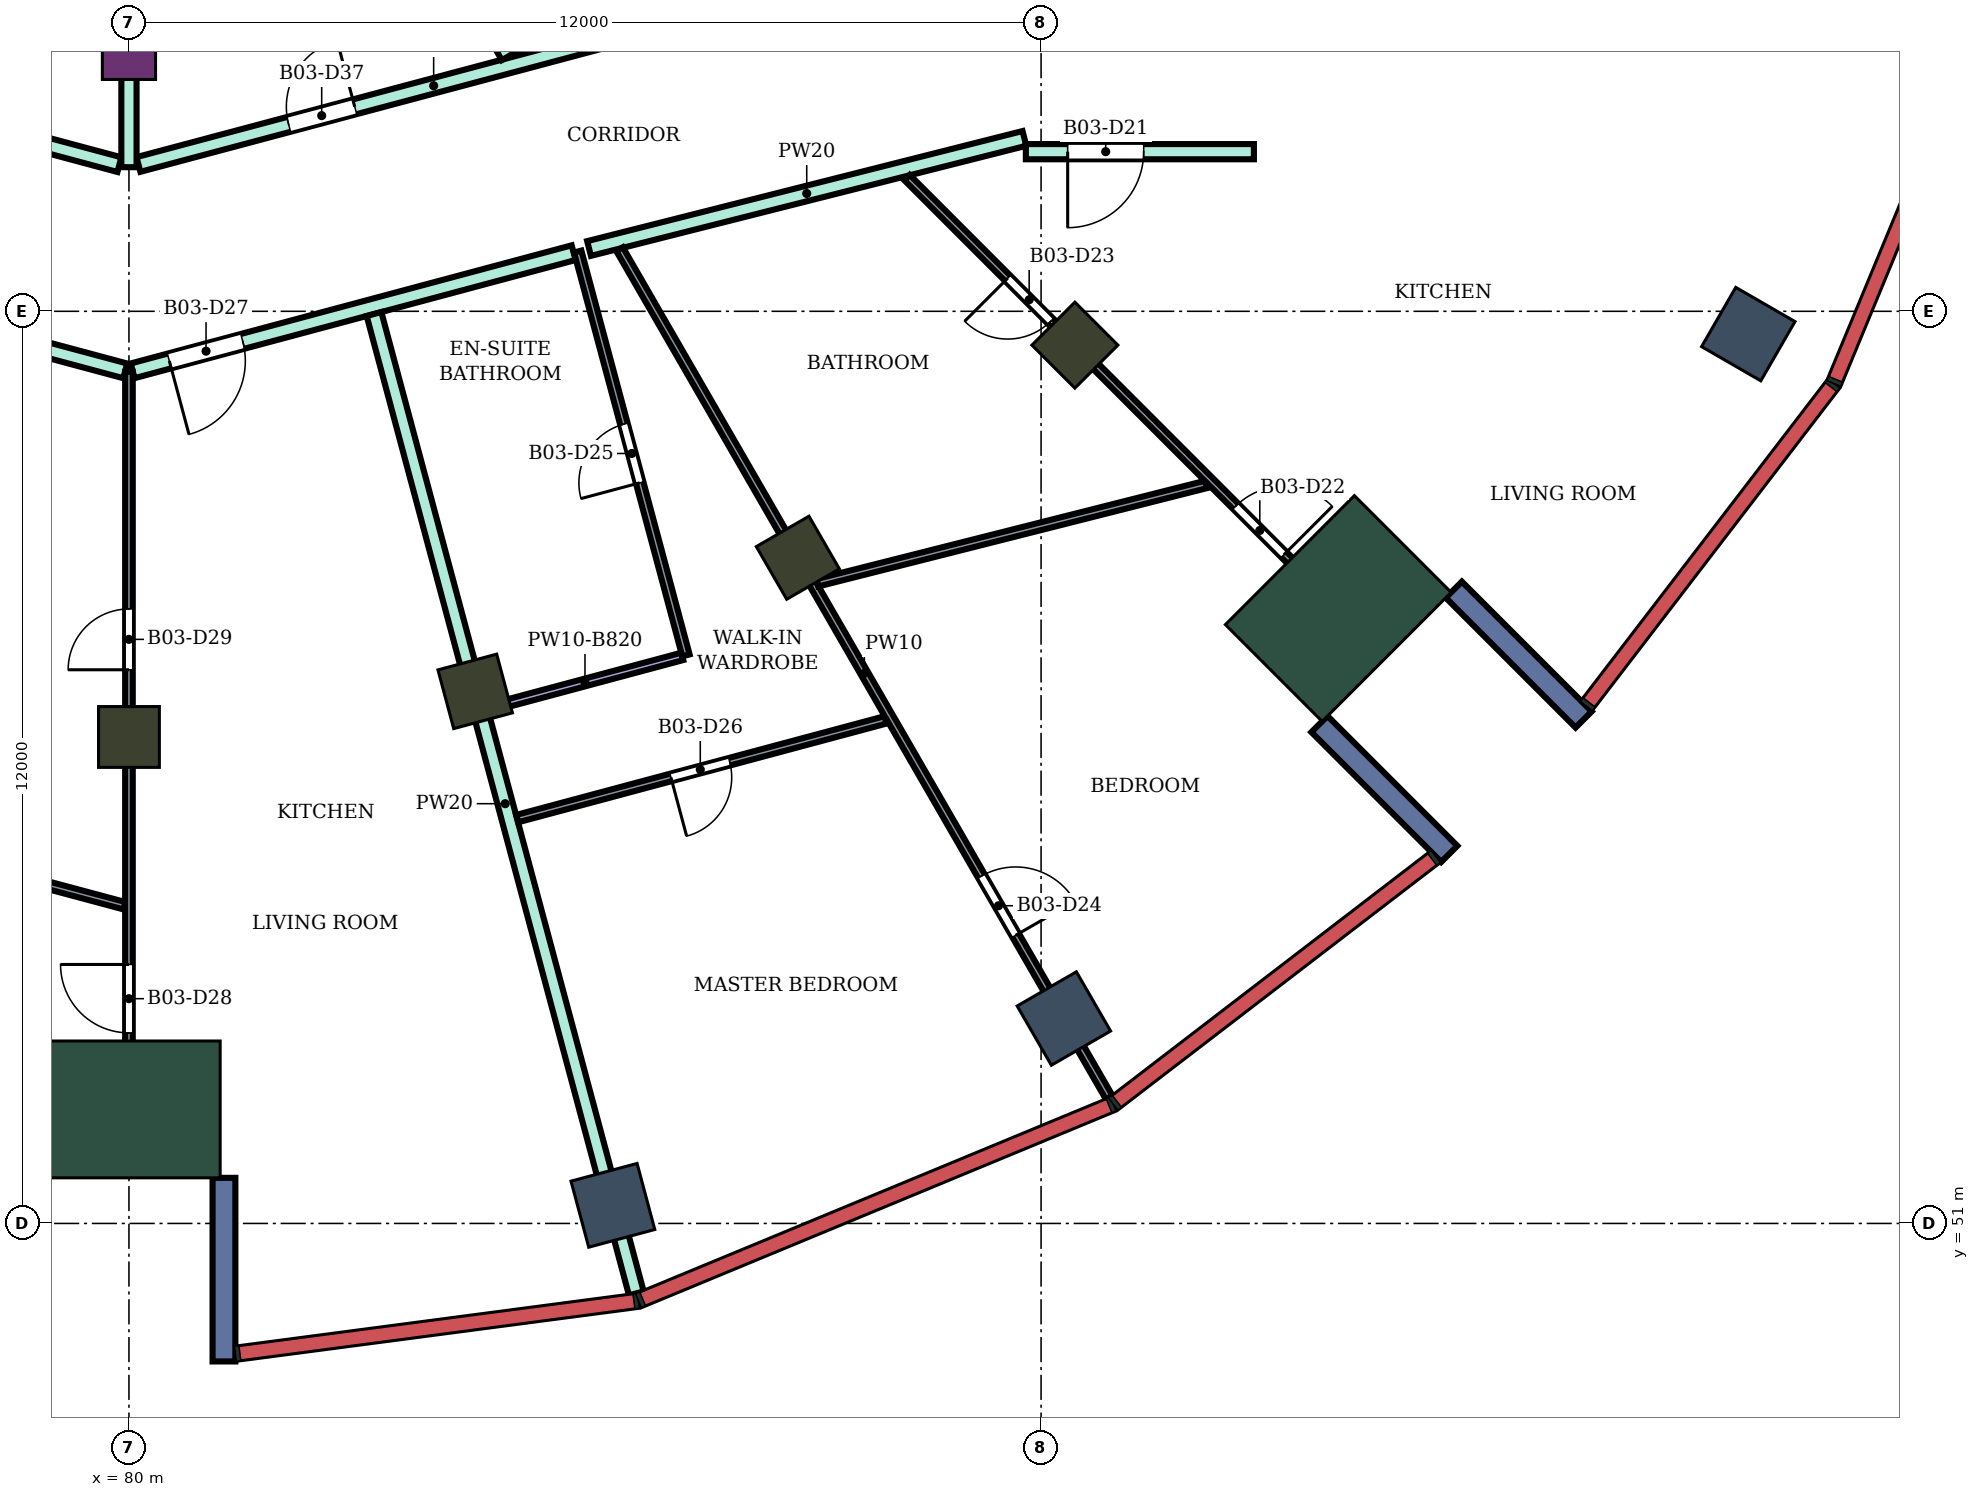
"""IFC4 building model, lengths in metres.
Left out: names, types, materials, properties, quantities, classifications, styles, units other than length and angle.
Written with IfcOpenShell. Run it as: python <this file> out.ifc"""

import sys

from ifc_helpers import new_model, si_unit, direction, frame, frame_2d, origin, origin_2d, place, context, subcontext, project, spatial, rectangle, extrude, element, fill, save


model = new_model("IFC4")
c1 = context("Model", 3, precision=1e-05, world=origin(), true_north=direction((0.0, 1.0)))
c2 = subcontext(c1, "Body", "Model", "MODEL_VIEW")
j1 = project(units=[si_unit("LENGTHUNIT", "METRE"), si_unit("PLANEANGLEUNIT", "RADIAN")], contexts=[c1])
p1 = place(None, origin())
s1 = spatial("IfcSite", under=j1, at=p1, CompositionType="ELEMENT")
p2 = place(p1, origin())
s2 = spatial("IfcBuilding", under=s1, at=p2, CompositionType="ELEMENT")
p3 = place(p2, frame((0.0, 0.0, 245.7)))
s3 = spatial("IfcBuildingStorey", under=s2, at=p3, CompositionType="ELEMENT", Elevation=245.7)
for number, where, z_axis, x_axis in (
    (1, (86.367, 51.238, 0.0), (0.0, 0.0, 1.0), (0.259, -0.966, 0.0)),
    (2, (92.3, 53.696, 0.0), (0.0, 0.0, 1.0), (0.5, -0.866, 0.0)),
    (3, (101.304, 62.7, 0.0), (0.0, 0.0, 1.0), (0.866, -0.5, 0.0)),
):
    element("IfcColumn", number, at=place(p3, frame(where, z_axis=z_axis, x_axis=x_axis)), inside=s3, PredefinedType="COLUMN", context=c2, shape_type="SweptSolid", body=[
        extrude(rectangle(XDim=0.9, YDim=0.9, at=origin_2d()), origin(), (0.0, 0.0, 1.0), 4.2),
    ])
for number, where, z_axis, x_axis in (
    (4, (80.0, 57.4, 0.0), (0.0, 0.0, 1.0), (0.0, -1.0, 0.0)),
    (5, (84.555, 58.0, 0.0), (0.0, 0.0, 1.0), (0.259, -0.966, 0.0)),
    (6, (88.8, 59.758, 0.0), (0.0, 0.0, 1.0), (0.5, -0.866, 0.0)),
    (7, (92.445, 62.555, 0.0), (0.0, 0.0, 1.0), (0.707, -0.707, 0.0)),
):
    element("IfcColumn", number, at=place(p3, frame(where, z_axis=z_axis, x_axis=x_axis)), inside=s3, PredefinedType="COLUMN", context=c2, shape_type="SweptSolid", body=[
        extrude(rectangle(XDim=0.8, YDim=0.8, at=origin_2d()), origin(), (0.0, 0.0, 1.0), 4.2),
    ])
p4 = place(p3, frame((80.0, 66.4, 0.0), z_axis=(0.0, 0.0, 1.0), x_axis=(0.0, -1.0, 0.0)))
e8 = element("IfcColumn", 8, at=p4, inside=s3, PredefinedType="COLUMN", context=c2, shape_type="SweptSolid", body=[
    extrude(rectangle(XDim=0.7, YDim=0.7, at=origin_2d()), origin(), (0.0, 0.0, 1.0), 4.2),
])
for number, where, z_axis, x_axis in (
    (9, (80.0, 52.5, 0.0), (0.0, 0.0, 1.0), (0.0, -1.0, 0.0)),
    (10, (95.91, 59.09, 0.0), (0.0, 0.0, 1.0), (0.707, -0.707, 0.0)),
):
    element("IfcColumn", number, at=place(p3, frame(where, z_axis=z_axis, x_axis=x_axis)), inside=s3, PredefinedType="COLUMN", context=c2, shape_type="SweptSolid", body=[
        extrude(rectangle(XDim=1.8, YDim=2.4, at=origin_2d()), origin(), (0.0, 0.0, 1.0), 4.2),
    ])
for number, where, z_axis, x_axis in (
    (11, (81.25, 51.6, 0.0), (0.0, 0.0, 1.0), (0.0, -1.0, 0.0)),
    (12, (95.662, 57.57, 0.0), (0.0, 0.0, 1.0), (0.707, -0.707, 0.0)),
    (13, (97.43, 59.338, 0.0), (0.0, 0.0, 1.0), (0.707, -0.707, 0.0)),
):
    element("IfcWall", number, at=place(p3, frame(where, z_axis=z_axis, x_axis=x_axis)), inside=s3, PredefinedType="NOTDEFINED", context=c2, shape_type="SweptSolid", body=[
        extrude(rectangle(XDim=2.416, YDim=0.3, at=frame_2d((1.208, 0.0))), origin(), (0.0, 0.0, 1.0), 4.2),
    ])
p5 = place(p3, frame((73.947, 63.826, 0.0), z_axis=(0.0, 0.0, 1.0), x_axis=(0.965908253407, -0.258884619088, 0.0)))
e14 = element("IfcWall", 14, at=p5, inside=s3, PredefinedType="PARTITIONING", context=c2, shape_type="SweptSolid", body=[
    extrude(rectangle(XDim=6.217, YDim=0.2, at=frame_2d((3.108, 0.0))), origin(), (0.0, 0.0, 1.0), 3.75),
])
p6 = place(p3, frame((74.603, 66.342, 0.0), z_axis=(0.0, 0.0, 1.0), x_axis=(0.965920893652, -0.258837453254, 0.0)))
e15 = element("IfcWall", 15, at=p6, inside=s3, PredefinedType="PARTITIONING", context=c2, shape_type="SweptSolid", body=[
    extrude(rectangle(XDim=5.458, YDim=0.2, at=frame_2d((2.729, 0.0))), origin(), (0.0, 0.0, 1.0), 3.75),
])
p7 = place(p6, frame((2.512, 0.0, 0.0)))
e16 = element("IfcOpeningElement", 16, at=p7, cuts=e15, PredefinedType="OPENING", context=c2, shape_type="SweptSolid", body=[
    extrude(rectangle(XDim=0.9, YDim=2.1, at=frame_2d((0.45, 1.05))), frame((0.0, 0.11, 0.0), z_axis=(0.0, -1.0, 0.0), x_axis=(1.0, 0.0, 0.0)), (0.0, 0.0, 1.0), 0.22),
])
p8 = place(p3, frame((80.125, 64.932, 0.0), z_axis=(0.0, 0.0, 1.0), x_axis=(0.966236955806, 0.257655089674, 0.0)))
e17 = element("IfcWall", 17, at=p8, inside=s3, PredefinedType="PARTITIONING", context=c2, shape_type="SweptSolid", body=[
    extrude(rectangle(XDim=8.039, YDim=0.2, at=frame_2d((4.02, 0.0))), origin(), (0.0, 0.0, 1.0), 3.75),
])
p9 = place(p8, frame((6.298, 0.0, 0.0)))
e18 = element("IfcOpeningElement", 18, at=p9, cuts=e17, PredefinedType="OPENING", context=c2, shape_type="SweptSolid", body=[
    extrude(rectangle(XDim=0.9, YDim=2.1, at=frame_2d((0.45, 1.05))), frame((0.0, 0.11, 0.0), z_axis=(0.0, -1.0, 0.0), x_axis=(1.0, 0.0, 0.0)), (0.0, 0.0, 1.0), 0.22),
])
p10 = place(p8, frame((2.045, 0.0, 0.0)))
e19 = element("IfcOpeningElement", 19, at=p10, cuts=e17, PredefinedType="OPENING", context=c2, shape_type="SweptSolid", body=[
    extrude(rectangle(XDim=0.9, YDim=2.1, at=frame_2d((0.45, 1.05))), frame((0.0, 0.11, 0.0), z_axis=(0.0, -1.0, 0.0), x_axis=(1.0, 0.0, 0.0)), (0.0, 0.0, 1.0), 0.22),
])
p11 = place(p3, frame((80.048, 62.217, 0.0), z_axis=(0.0, 0.0, 1.0), x_axis=(0.965941520544, 0.258760466242, 0.0)))
e20 = element("IfcWall", 20, at=p11, inside=s3, PredefinedType="PARTITIONING", context=c2, shape_type="SweptSolid", body=[
    extrude(rectangle(XDim=6.006, YDim=0.2, at=frame_2d((3.003, 0.0))), origin(), (0.0, 0.0, 1.0), 3.75),
])
p12 = place(p11, frame((0.5, 0.0, 0.0)))
e21 = element("IfcOpeningElement", 21, at=p12, cuts=e20, PredefinedType="OPENING", context=c2, shape_type="SweptSolid", body=[
    extrude(rectangle(XDim=1.0, YDim=2.1, at=frame_2d((0.5, 1.05))), frame((0.0, 0.11, 0.0), z_axis=(0.0, -1.0, 0.0), x_axis=(1.0, 0.0, 0.0)), (0.0, 0.0, 1.0), 0.22),
])
p13 = place(p3, frame((80.0, 64.896, 0.0), z_axis=(0.0, 0.0, 1.0), x_axis=(0.0, 1.0, 0.0)))
e22 = element("IfcWall", 22, at=p13, inside=s3, PredefinedType="PARTITIONING", context=c2, shape_type="SweptSolid", body=[
    extrude(rectangle(XDim=2.405, YDim=0.2, at=frame_2d((1.203, 0.0))), origin(), (0.0, 0.0, 1.0), 3.75),
])
p14 = place(p3, frame((83.224, 62.964, 0.0), z_axis=(0.0, 0.0, 1.0), x_axis=(0.258742489642, -0.965946336012, 0.0)))
e23 = element("IfcWall", 23, at=p14, inside=s3, PredefinedType="PARTITIONING", context=c2, shape_type="SweptSolid", body=[
    extrude(rectangle(XDim=13.338, YDim=0.2, at=frame_2d((6.669, 0.0))), origin(), (0.0, 0.0, 1.0), 3.75),
])
p15 = place(p3, frame((83.85, 68.333, 0.0), z_axis=(0.0, 0.0, 1.0), x_axis=(0.500080019051, -0.865979199835, 0.0)))
e24 = element("IfcWall", 24, at=p15, inside=s3, PredefinedType="PARTITIONING", context=c2, shape_type="SweptSolid", body=[
    extrude(rectangle(XDim=2.285, YDim=0.2, at=frame_2d((1.143, 0.0))), origin(), (0.0, 0.0, 1.0), 3.75),
])
p16 = place(p3, frame((86.053, 63.826, 0.0), z_axis=(0.0, 0.0, 1.0), x_axis=(0.969490004987, 0.245130843083, 0.0)))
e25 = element("IfcWall", 25, at=p16, inside=s3, PredefinedType="PARTITIONING", context=c2, shape_type="SweptSolid", body=[
    extrude(rectangle(XDim=5.908, YDim=0.2, at=frame_2d((2.954, 0.0))), origin(), (0.0, 0.0, 1.0), 3.75),
])
p17 = place(p3, frame((91.8, 65.1, 0.0), z_axis=(0.0, 0.0, 1.0), x_axis=(1.0, 0.0, 0.0)))
e26 = element("IfcWall", 26, at=p17, inside=s3, PredefinedType="PARTITIONING", context=c2, shape_type="SweptSolid", body=[
    extrude(rectangle(XDim=3.0, YDim=0.2, at=frame_2d((1.5, 0.0))), origin(), (0.0, 0.0, 1.0), 3.75),
])
p18 = place(p17, frame((0.55, 0.0, 0.0)))
e27 = element("IfcOpeningElement", 27, at=p18, cuts=e26, PredefinedType="OPENING", context=c2, shape_type="SweptSolid", body=[
    extrude(rectangle(XDim=1.0, YDim=2.1, at=frame_2d((0.5, 1.05))), frame((0.0, 0.11, 0.0), z_axis=(0.0, -1.0, 0.0), x_axis=(1.0, 0.0, 0.0)), (0.0, 0.0, 1.0), 0.22),
])
p19 = place(p3, frame((70.188, 57.793, 0.0), z_axis=(0.0, 0.0, 1.0), x_axis=(0.965911138035, -0.258873856194, 0.0)))
e28 = element("IfcWall", 28, at=p19, inside=s3, PredefinedType="PARTITIONING", context=c2, shape_type="SweptSolid", body=[
    extrude(rectangle(XDim=10.098, YDim=0.1, at=frame_2d((5.049, 0.0))), origin(), (0.0, 0.0, 1.0), 3.75),
])
p20 = place(p19, frame((2.057, 0.0, 0.0)))
e29 = element("IfcOpeningElement", 29, at=p20, cuts=e28, PredefinedType="OPENING", context=c2, shape_type="SweptSolid", body=[
    extrude(rectangle(XDim=0.8, YDim=2.1, at=frame_2d((0.4, 1.05))), frame((0.0, 0.06, 0.0), z_axis=(0.0, -1.0, 0.0), x_axis=(1.0, 0.0, 0.0)), (0.0, 0.0, 1.0), 0.12),
])
p21 = place(p3, frame((80.0, 51.8, 0.0), z_axis=(0.0, 0.0, 1.0), x_axis=(0.0, 1.0, 0.0)))
e30 = element("IfcWall", 30, at=p21, inside=s3, PredefinedType="PARTITIONING", context=c2, shape_type="SweptSolid", body=[
    extrude(rectangle(XDim=10.404, YDim=0.1, at=frame_2d((5.202, 0.0))), origin(), (0.0, 0.0, 1.0), 3.75),
])
p22 = place(p21, frame((1.707, 0.0, 0.0)))
e31 = element("IfcOpeningElement", 31, at=p22, cuts=e30, PredefinedType="OPENING", context=c2, shape_type="SweptSolid", body=[
    extrude(rectangle(XDim=0.9, YDim=2.1, at=frame_2d((0.45, 1.05))), frame((0.0, 0.06, 0.0), z_axis=(0.0, -1.0, 0.0), x_axis=(1.0, 0.0, 0.0)), (0.0, 0.0, 1.0), 0.12),
])
p23 = place(p21, frame((6.484, 0.0, 0.0)))
e32 = element("IfcOpeningElement", 32, at=p23, cuts=e30, PredefinedType="OPENING", context=c2, shape_type="SweptSolid", body=[
    extrude(rectangle(XDim=0.8, YDim=2.1, at=frame_2d((0.4, 1.05))), frame((0.0, 0.06, 0.0), z_axis=(0.0, -1.0, 0.0), x_axis=(1.0, 0.0, 0.0)), (0.0, 0.0, 1.0), 0.12),
])
p24 = place(p3, frame((84.719, 57.774, 0.0), z_axis=(0.0, 0.0, 1.0), x_axis=(0.965902408875, 0.258906424273, 0.0)))
e33 = element("IfcWall", 33, at=p24, inside=s3, PredefinedType="PARTITIONING", context=c2, shape_type="SweptSolid", body=[
    extrude(rectangle(XDim=2.651, YDim=0.1, at=frame_2d((1.325, 0.0))), origin(), (0.0, 0.0, 1.0), 3.38),
])
p25 = place(p3, frame((85.108, 56.326, 0.0), z_axis=(0.0, 0.0, 1.0), x_axis=(0.965911122806, 0.258873913014, 0.0)))
e34 = element("IfcWall", 34, at=p25, inside=s3, PredefinedType="PARTITIONING", context=c2, shape_type="SweptSolid", body=[
    extrude(rectangle(XDim=5.017, YDim=0.1, at=frame_2d((2.509, 0.0))), origin(), (0.0, 0.0, 1.0), 3.75),
])
p26 = place(p25, frame((2.094, 0.0, 0.0)))
e35 = element("IfcOpeningElement", 35, at=p26, cuts=e34, PredefinedType="OPENING", context=c2, shape_type="SweptSolid", body=[
    extrude(rectangle(XDim=0.8, YDim=2.1, at=frame_2d((0.4, 1.05))), frame((0.0, 0.06, 0.0), z_axis=(0.0, -1.0, 0.0), x_axis=(1.0, 0.0, 0.0)), (0.0, 0.0, 1.0), 0.12),
])
p27 = place(p3, frame((85.904, 63.786, 0.0), z_axis=(0.0, 0.0, 1.0), x_axis=(0.258855888267, -0.96591595344, 0.0)))
e36 = element("IfcWall", 36, at=p27, inside=s3, PredefinedType="PARTITIONING", context=c2, shape_type="SweptSolid", body=[
    extrude(rectangle(XDim=5.5, YDim=0.1, at=frame_2d((2.75, 0.0))), origin(), (0.0, 0.0, 1.0), 3.75),
])
p28 = place(p27, frame((2.35, 0.0, 0.0)))
e37 = element("IfcOpeningElement", 37, at=p28, cuts=e36, PredefinedType="OPENING", context=c2, shape_type="SweptSolid", body=[
    extrude(rectangle(XDim=0.8, YDim=2.1, at=frame_2d((0.4, 1.05))), frame((0.0, 0.06, 0.0), z_axis=(0.0, -1.0, 0.0), x_axis=(1.0, 0.0, 0.0)), (0.0, 0.0, 1.0), 0.12),
])
p29 = place(p3, frame((86.454, 63.818, 0.0), z_axis=(0.0, 0.0, 1.0), x_axis=(0.499914882008, -0.866074541103, 0.0)))
e38 = element("IfcWall", 38, at=p29, inside=s3, PredefinedType="PARTITIONING", context=c2, shape_type="SweptSolid", body=[
    extrude(rectangle(XDim=12.886, YDim=0.1, at=frame_2d((6.443, 0.0))), origin(), (0.0, 0.0, 1.0), 3.75),
])
p30 = place(p29, frame((9.524, 0.0, 0.0)))
e39 = element("IfcOpeningElement", 39, at=p30, cuts=e38, PredefinedType="OPENING", context=c2, shape_type="SweptSolid", body=[
    extrude(rectangle(XDim=0.9, YDim=2.1, at=frame_2d((0.45, 1.05))), frame((0.0, 0.06, 0.0), z_axis=(0.0, -1.0, 0.0), x_axis=(1.0, 0.0, 0.0)), (0.0, 0.0, 1.0), 0.12),
])
p31 = place(p3, frame((89.058, 59.429, 0.0), z_axis=(0.0, 0.0, 1.0), x_axis=(0.96946321375, 0.2452367778, 0.0)))
e40 = element("IfcWall", 40, at=p31, inside=s3, PredefinedType="PARTITIONING", context=c2, shape_type="SweptSolid", body=[
    extrude(rectangle(XDim=5.272, YDim=0.1, at=frame_2d((2.636, 0.0))), origin(), (0.0, 0.0, 1.0), 3.75),
])
p32 = place(p3, frame((90.237, 64.759, 0.0), z_axis=(0.0, 0.0, 1.0), x_axis=(0.706952774706, -0.707260754132, 0.0)))
e41 = element("IfcWall", 41, at=p32, inside=s3, PredefinedType="PARTITIONING", context=c2, shape_type="SweptSolid", body=[
    extrude(rectangle(XDim=8.72, YDim=0.1, at=frame_2d((4.36, 0.0))), origin(), (0.0, 0.0, 1.0), 3.75),
])
p33 = place(p32, frame((6.114, 0.0, 0.0)))
e42 = element("IfcOpeningElement", 42, at=p33, cuts=e41, PredefinedType="OPENING", context=c2, shape_type="SweptSolid", body=[
    extrude(rectangle(XDim=0.9, YDim=2.1, at=frame_2d((0.45, 1.05))), frame((0.0, 0.06, 0.0), z_axis=(0.0, -1.0, 0.0), x_axis=(1.0, 0.0, 0.0)), (0.0, 0.0, 1.0), 0.12),
])
p34 = place(p32, frame((1.872, 0.0, 0.0)))
e43 = element("IfcOpeningElement", 43, at=p34, cuts=e41, PredefinedType="OPENING", context=c2, shape_type="SweptSolid", body=[
    extrude(rectangle(XDim=0.8, YDim=2.1, at=frame_2d((0.4, 1.05))), frame((0.0, 0.06, 0.0), z_axis=(0.0, -1.0, 0.0), x_axis=(1.0, 0.0, 0.0)), (0.0, 0.0, 1.0), 0.12),
])
p35 = place(p18, frame((1.0, 0.0, 0.0), z_axis=(0.0, 0.0, 1.0), x_axis=(-1.0, 0.0, 0.0)))
e44 = element("IfcDoor", 44, at=p35, inside=s3, OperationType="SINGLE_SWING_RIGHT", PredefinedType="DOOR", context=c2, shape_type="SweptSolid", body=[
    extrude(rectangle(XDim=1.0, YDim=2.1, at=frame_2d((0.5, 1.05))), frame((0.0, 0.025, 0.0), z_axis=(0.0, -1.0, 0.0), x_axis=(1.0, 0.0, 0.0)), (0.0, 0.0, 1.0), 0.05),
])
fill(e27, e44)
p36 = place(p33, origin())
e45 = element("IfcDoor", 45, at=p36, inside=s3, OperationType="SINGLE_SWING_RIGHT", PredefinedType="DOOR", context=c2, shape_type="SweptSolid", body=[
    extrude(rectangle(XDim=0.9, YDim=2.1, at=frame_2d((0.45, 1.05))), frame((0.0, 0.025, 0.0), z_axis=(0.0, -1.0, 0.0), x_axis=(1.0, 0.0, 0.0)), (0.0, 0.0, 1.0), 0.05),
])
fill(e42, e45)
p37 = place(p34, frame((0.8, 0.0, 0.0), z_axis=(0.0, 0.0, 1.0), x_axis=(-1.0, 0.0, 0.0)))
e46 = element("IfcDoor", 46, at=p37, inside=s3, OperationType="SINGLE_SWING_RIGHT", PredefinedType="DOOR", context=c2, shape_type="SweptSolid", body=[
    extrude(rectangle(XDim=0.8, YDim=2.1, at=frame_2d((0.4, 1.05))), frame((0.0, 0.025, 0.0), z_axis=(0.0, -1.0, 0.0), x_axis=(1.0, 0.0, 0.0)), (0.0, 0.0, 1.0), 0.05),
])
fill(e43, e46)
p38 = place(p30, origin())
e47 = element("IfcDoor", 47, at=p38, inside=s3, OperationType="SINGLE_SWING_RIGHT", PredefinedType="DOOR", context=c2, shape_type="SweptSolid", body=[
    extrude(rectangle(XDim=0.9, YDim=2.1, at=frame_2d((0.45, 1.05))), frame((0.0, 0.025, 0.0), z_axis=(0.0, -1.0, 0.0), x_axis=(1.0, 0.0, 0.0)), (0.0, 0.0, 1.0), 0.05),
])
fill(e39, e47)
p39 = place(p28, frame((0.8, 0.0, 0.0), z_axis=(0.0, 0.0, 1.0), x_axis=(-1.0, 0.0, 0.0)))
e48 = element("IfcDoor", 48, at=p39, inside=s3, OperationType="SINGLE_SWING_LEFT", PredefinedType="DOOR", context=c2, shape_type="SweptSolid", body=[
    extrude(rectangle(XDim=0.8, YDim=2.1, at=frame_2d((0.4, 1.05))), frame((0.0, 0.025, 0.0), z_axis=(0.0, -1.0, 0.0), x_axis=(1.0, 0.0, 0.0)), (0.0, 0.0, 1.0), 0.05),
])
fill(e37, e48)
p40 = place(p26, frame((0.8, 0.0, 0.0), z_axis=(0.0, 0.0, 1.0), x_axis=(-1.0, 0.0, 0.0)))
e49 = element("IfcDoor", 49, at=p40, inside=s3, OperationType="SINGLE_SWING_RIGHT", PredefinedType="DOOR", context=c2, shape_type="SweptSolid", body=[
    extrude(rectangle(XDim=0.8, YDim=2.1, at=frame_2d((0.4, 1.05))), frame((0.0, 0.025, 0.0), z_axis=(0.0, -1.0, 0.0), x_axis=(1.0, 0.0, 0.0)), (0.0, 0.0, 1.0), 0.05),
])
fill(e35, e49)
p41 = place(p12, frame((1.0, 0.0, 0.0), z_axis=(0.0, 0.0, 1.0), x_axis=(-1.0, 0.0, 0.0)))
e50 = element("IfcDoor", 50, at=p41, inside=s3, OperationType="SINGLE_SWING_RIGHT", PredefinedType="DOOR", context=c2, shape_type="SweptSolid", body=[
    extrude(rectangle(XDim=1.0, YDim=2.1, at=frame_2d((0.5, 1.05))), frame((0.0, 0.025, 0.0), z_axis=(0.0, -1.0, 0.0), x_axis=(1.0, 0.0, 0.0)), (0.0, 0.0, 1.0), 0.05),
])
fill(e21, e50)
p42 = place(p22, origin())
e51 = element("IfcDoor", 51, at=p42, inside=s3, OperationType="SINGLE_SWING_RIGHT", PredefinedType="DOOR", context=c2, shape_type="SweptSolid", body=[
    extrude(rectangle(XDim=0.9, YDim=2.1, at=frame_2d((0.45, 1.05))), frame((0.0, 0.025, 0.0), z_axis=(0.0, -1.0, 0.0), x_axis=(1.0, 0.0, 0.0)), (0.0, 0.0, 1.0), 0.05),
])
fill(e31, e51)
p43 = place(p23, origin())
e52 = element("IfcDoor", 52, at=p43, inside=s3, OperationType="SINGLE_SWING_LEFT", PredefinedType="DOOR", context=c2, shape_type="SweptSolid", body=[
    extrude(rectangle(XDim=0.8, YDim=2.1, at=frame_2d((0.4, 1.05))), frame((0.0, 0.025, 0.0), z_axis=(0.0, -1.0, 0.0), x_axis=(1.0, 0.0, 0.0)), (0.0, 0.0, 1.0), 0.05),
])
fill(e32, e52)
p44 = place(p10, origin())
e53 = element("IfcDoor", 53, at=p44, inside=s3, OperationType="SINGLE_SWING_RIGHT", PredefinedType="DOOR", context=c2, shape_type="SweptSolid", body=[
    extrude(rectangle(XDim=0.9, YDim=2.1, at=frame_2d((0.45, 1.05))), frame((0.0, 0.025, 0.0), z_axis=(0.0, -1.0, 0.0), x_axis=(1.0, 0.0, 0.0)), (0.0, 0.0, 1.0), 0.05),
])
fill(e19, e53)
save(model, sys.argv[1])
